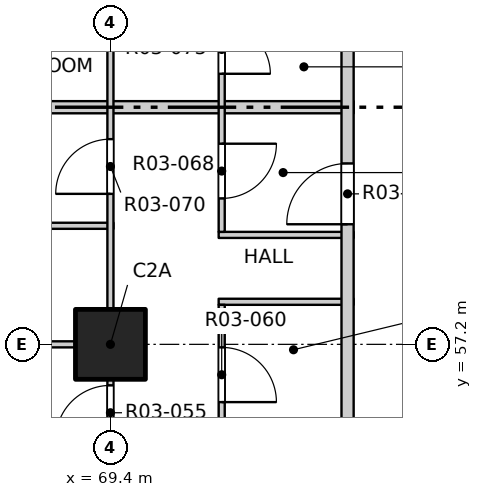
"""IFC4 building model, lengths in metres.
Left out: names, types, materials, properties, quantities, classifications, styles, units other than length and angle.
Written with IfcOpenShell. Run it as: python <this file> out.ifc"""

import sys

from ifc_helpers import new_model, si_unit, direction, frame, frame_2d, origin, origin_2d, place, context, subcontext, project, spatial, rectangle, extrude, element, fill, save


model = new_model("IFC4")
c1 = context("Model", 3, precision=1e-05, world=origin(), true_north=direction((0.0, 1.0)))
c2 = subcontext(c1, "Body", "Model", "MODEL_VIEW")
j1 = project(units=[si_unit("LENGTHUNIT", "METRE"), si_unit("PLANEANGLEUNIT", "RADIAN")], contexts=[c1])
p1 = place(None, origin())
s1 = spatial("IfcSite", under=j1, at=p1, CompositionType="ELEMENT")
p2 = place(p1, origin())
s2 = spatial("IfcBuilding", under=s1, at=p2, CompositionType="ELEMENT")
p3 = place(p2, frame((0.0, 0.0, 39.9)))
s3 = spatial("IfcBuildingStorey", under=s2, at=p3, CompositionType="ELEMENT", Elevation=39.9)
p4 = place(p3, frame((69.4, 57.2, -0.25), z_axis=(0.0, 0.0, 1.0), x_axis=(1.0, 0.0, 0.0)))
e1 = element("IfcColumn", 1, at=p4, inside=s3, PredefinedType="COLUMN", context=c2, shape_type="SweptSolid", body=[
    extrude(rectangle(XDim=1.15, YDim=1.15, at=origin_2d()), origin(), (0.0, 0.0, 1.0), 3.4),
])
p5 = place(p3, frame((61.9, 57.2, 0.0), z_axis=(0.0, 0.0, 1.0), x_axis=(1.0, 0.0, 0.0)))
e2 = element("IfcWall", 2, at=p5, inside=s3, PredefinedType="PARTITIONING", context=c2, shape_type="SweptSolid", body=[
    extrude(rectangle(XDim=7.55, YDim=0.1, at=frame_2d((3.775, 0.0))), origin(), (0.0, 0.0, 1.0), 2.55),
])
for number, where, z_axis, x_axis in (
    (3, (71.18, 57.9, 0.0), (0.0, 0.0, 1.0), (1.0, 0.0, 0.0)),
    (4, (71.18, 59.0, 0.0), (0.0, 0.0, 1.0), (1.0, 0.0, 0.0)),
):
    element("IfcWall", number, at=place(p3, frame(where, z_axis=z_axis, x_axis=x_axis)), inside=s3, PredefinedType="PARTITIONING", context=c2, shape_type="SweptSolid", body=[
        extrude(rectangle(XDim=2.22, YDim=0.1, at=frame_2d((1.11, 0.0))), origin(), (0.0, 0.0, 1.0), 3.15),
    ])
p6 = place(p3, frame((65.75, 59.15, 0.0), z_axis=(0.0, 0.0, 1.0), x_axis=(1.0, 0.0, 0.0)))
e5 = element("IfcWall", 5, at=p6, inside=s3, PredefinedType="PARTITIONING", context=c2, shape_type="SweptSolid", body=[
    extrude(rectangle(XDim=3.7, YDim=0.1, at=frame_2d((1.85, 0.0))), origin(), (0.0, 0.0, 1.0), 3.15),
])
p7 = place(p3, frame((61.9, 61.1, 0.0), z_axis=(0.0, 0.0, 1.0), x_axis=(1.0, 0.0, 0.0)))
e6 = element("IfcWall", 6, at=p7, inside=s3, PredefinedType="PARTITIONING", context=c2, shape_type="SweptSolid", body=[
    extrude(rectangle(XDim=11.5, YDim=0.2, at=frame_2d((5.75, 0.0))), origin(), (0.0, 0.0, 1.0), 3.15),
])
p8 = place(p3, frame((69.4, 41.9, 0.0), z_axis=(0.0, 0.0, 1.0), x_axis=(0.0, 1.0, 0.0)))
e7 = element("IfcWall", 7, at=p8, inside=s3, PredefinedType="PARTITIONING", context=c2, shape_type="SweptSolid", body=[
    extrude(rectangle(XDim=46.2, YDim=0.1, at=frame_2d((23.1, 0.0))), origin(), (0.0, 0.0, 1.0), 3.15),
])
p9 = place(p8, frame((1.2, 0.0, 0.0)))
e8 = element("IfcOpeningElement", 8, at=p9, cuts=e7, PredefinedType="OPENING", context=c2, shape_type="SweptSolid", body=[
    extrude(rectangle(XDim=0.9, YDim=2.1, at=frame_2d((0.45, 1.05))), frame((0.0, 0.06, 0.0), z_axis=(0.0, -1.0, 0.0), x_axis=(1.0, 0.0, 0.0)), (0.0, 0.0, 1.0), 0.12),
])
p10 = place(p8, frame((5.9, 0.0, 0.0)))
e9 = element("IfcOpeningElement", 9, at=p10, cuts=e7, PredefinedType="OPENING", context=c2, shape_type="SweptSolid", body=[
    extrude(rectangle(XDim=0.9, YDim=2.1, at=frame_2d((0.45, 1.05))), frame((0.0, 0.06, 0.0), z_axis=(0.0, -1.0, 0.0), x_axis=(1.0, 0.0, 0.0)), (0.0, 0.0, 1.0), 0.12),
])
p11 = place(p8, frame((9.0, 0.0, 0.0)))
e10 = element("IfcOpeningElement", 10, at=p11, cuts=e7, PredefinedType="OPENING", context=c2, shape_type="SweptSolid", body=[
    extrude(rectangle(XDim=0.9, YDim=2.1, at=frame_2d((0.45, 1.05))), frame((0.0, 0.06, 0.0), z_axis=(0.0, -1.0, 0.0), x_axis=(1.0, 0.0, 0.0)), (0.0, 0.0, 1.0), 0.12),
])
p12 = place(p8, frame((13.725, 0.0, 0.0)))
e11 = element("IfcOpeningElement", 11, at=p12, cuts=e7, PredefinedType="OPENING", context=c2, shape_type="SweptSolid", body=[
    extrude(rectangle(XDim=0.9, YDim=2.1, at=frame_2d((0.45, 1.05))), frame((0.0, 0.06, 0.0), z_axis=(0.0, -1.0, 0.0), x_axis=(1.0, 0.0, 0.0)), (0.0, 0.0, 1.0), 0.12),
])
p13 = place(p8, frame((17.775, 0.0, 0.0)))
e12 = element("IfcOpeningElement", 12, at=p13, cuts=e7, PredefinedType="OPENING", context=c2, shape_type="SweptSolid", body=[
    extrude(rectangle(XDim=0.9, YDim=2.1, at=frame_2d((0.45, 1.05))), frame((0.0, 0.06, 0.0), z_axis=(0.0, -1.0, 0.0), x_axis=(1.0, 0.0, 0.0)), (0.0, 0.0, 1.0), 0.12),
])
p14 = place(p8, frame((20.7, 0.0, 0.0)))
e13 = element("IfcOpeningElement", 13, at=p14, cuts=e7, PredefinedType="OPENING", context=c2, shape_type="SweptSolid", body=[
    extrude(rectangle(XDim=0.9, YDim=2.1, at=frame_2d((0.45, 1.05))), frame((0.0, 0.06, 0.0), z_axis=(0.0, -1.0, 0.0), x_axis=(1.0, 0.0, 0.0)), (0.0, 0.0, 1.0), 0.12),
])
p15 = place(p8, frame((25.575, 0.0, 0.0)))
e14 = element("IfcOpeningElement", 14, at=p15, cuts=e7, PredefinedType="OPENING", context=c2, shape_type="SweptSolid", body=[
    extrude(rectangle(XDim=0.9, YDim=2.1, at=frame_2d((0.45, 1.05))), frame((0.0, 0.06, 0.0), z_axis=(0.0, -1.0, 0.0), x_axis=(1.0, 0.0, 0.0)), (0.0, 0.0, 1.0), 0.12),
])
p16 = place(p8, frame((28.5, 0.0, 0.0)))
e15 = element("IfcOpeningElement", 15, at=p16, cuts=e7, PredefinedType="OPENING", context=c2, shape_type="SweptSolid", body=[
    extrude(rectangle(XDim=0.9, YDim=2.1, at=frame_2d((0.45, 1.05))), frame((0.0, 0.06, 0.0), z_axis=(0.0, -1.0, 0.0), x_axis=(1.0, 0.0, 0.0)), (0.0, 0.0, 1.0), 0.12),
])
p17 = place(p8, frame((33.375, 0.0, 0.0)))
e16 = element("IfcOpeningElement", 16, at=p17, cuts=e7, PredefinedType="OPENING", context=c2, shape_type="SweptSolid", body=[
    extrude(rectangle(XDim=0.9, YDim=2.1, at=frame_2d((0.45, 1.05))), frame((0.0, 0.06, 0.0), z_axis=(0.0, -1.0, 0.0), x_axis=(1.0, 0.0, 0.0)), (0.0, 0.0, 1.0), 0.12),
])
p18 = place(p8, frame((36.3, 0.0, 0.0)))
e17 = element("IfcOpeningElement", 17, at=p18, cuts=e7, PredefinedType="OPENING", context=c2, shape_type="SweptSolid", body=[
    extrude(rectangle(XDim=0.9, YDim=2.1, at=frame_2d((0.45, 1.05))), frame((0.0, 0.06, 0.0), z_axis=(0.0, -1.0, 0.0), x_axis=(1.0, 0.0, 0.0)), (0.0, 0.0, 1.0), 0.12),
])
p19 = place(p8, frame((40.2, 0.0, 0.0)))
e18 = element("IfcOpeningElement", 18, at=p19, cuts=e7, PredefinedType="OPENING", context=c2, shape_type="SweptSolid", body=[
    extrude(rectangle(XDim=0.9, YDim=2.1, at=frame_2d((0.45, 1.05))), frame((0.0, 0.06, 0.0), z_axis=(0.0, -1.0, 0.0), x_axis=(1.0, 0.0, 0.0)), (0.0, 0.0, 1.0), 0.12),
])
p20 = place(p8, frame((44.1, 0.0, 0.0)))
e19 = element("IfcOpeningElement", 19, at=p20, cuts=e7, PredefinedType="OPENING", context=c2, shape_type="SweptSolid", body=[
    extrude(rectangle(XDim=0.9, YDim=2.1, at=frame_2d((0.45, 1.05))), frame((0.0, 0.06, 0.0), z_axis=(0.0, -1.0, 0.0), x_axis=(1.0, 0.0, 0.0)), (0.0, 0.0, 1.0), 0.12),
])
p21 = place(p3, frame((71.23, 45.55, 0.0), z_axis=(0.0, 0.0, 1.0), x_axis=(0.0, 1.0, 0.0)))
e20 = element("IfcWall", 20, at=p21, inside=s3, PredefinedType="PARTITIONING", context=c2, shape_type="SweptSolid", body=[
    extrude(rectangle(XDim=12.3, YDim=0.1, at=frame_2d((6.15, 0.0))), origin(), (0.0, 0.0, 1.0), 3.15),
])
p22 = place(p21, frame((1.0, 0.0, 0.0)))
e21 = element("IfcOpeningElement", 21, at=p22, cuts=e20, PredefinedType="OPENING", context=c2, shape_type="SweptSolid", body=[
    extrude(rectangle(XDim=0.8, YDim=2.1, at=frame_2d((0.4, 1.05))), frame((0.0, 0.06, 0.0), z_axis=(0.0, -1.0, 0.0), x_axis=(1.0, 0.0, 0.0)), (0.0, 0.0, 1.0), 0.12),
])
p23 = place(p21, frame((3.35, 0.0, 0.0)))
e22 = element("IfcOpeningElement", 22, at=p23, cuts=e20, PredefinedType="OPENING", context=c2, shape_type="SweptSolid", body=[
    extrude(rectangle(XDim=0.9, YDim=2.1, at=frame_2d((0.45, 1.05))), frame((0.0, 0.06, 0.0), z_axis=(0.0, -1.0, 0.0), x_axis=(1.0, 0.0, 0.0)), (0.0, 0.0, 1.0), 0.12),
])
p24 = place(p21, frame((5.8, 0.0, 0.0)))
e23 = element("IfcOpeningElement", 23, at=p24, cuts=e20, PredefinedType="OPENING", context=c2, shape_type="SweptSolid", body=[
    extrude(rectangle(XDim=0.8, YDim=2.1, at=frame_2d((0.4, 1.05))), frame((0.0, 0.06, 0.0), z_axis=(0.0, -1.0, 0.0), x_axis=(1.0, 0.0, 0.0)), (0.0, 0.0, 1.0), 0.12),
])
p25 = place(p21, frame((8.4, 0.0, 0.0)))
e24 = element("IfcOpeningElement", 24, at=p25, cuts=e20, PredefinedType="OPENING", context=c2, shape_type="SweptSolid", body=[
    extrude(rectangle(XDim=0.8, YDim=2.1, at=frame_2d((0.4, 1.05))), frame((0.0, 0.06, 0.0), z_axis=(0.0, -1.0, 0.0), x_axis=(1.0, 0.0, 0.0)), (0.0, 0.0, 1.0), 0.12),
])
p26 = place(p21, frame((10.7, 0.0, 0.0)))
e25 = element("IfcOpeningElement", 25, at=p26, cuts=e20, PredefinedType="OPENING", context=c2, shape_type="SweptSolid", body=[
    extrude(rectangle(XDim=0.9, YDim=2.1, at=frame_2d((0.45, 1.05))), frame((0.0, 0.06, 0.0), z_axis=(0.0, -1.0, 0.0), x_axis=(1.0, 0.0, 0.0)), (0.0, 0.0, 1.0), 0.12),
])
p27 = place(p3, frame((71.23, 59.05, 0.0), z_axis=(0.0, 0.0, 1.0), x_axis=(0.0, 1.0, 0.0)))
e26 = element("IfcWall", 26, at=p27, inside=s3, PredefinedType="PARTITIONING", context=c2, shape_type="SweptSolid", body=[
    extrude(rectangle(XDim=3.9, YDim=0.1, at=frame_2d((1.95, 0.0))), origin(), (0.0, 0.0, 1.0), 3.15),
])
p28 = place(p27, frame((0.55, 0.0, 0.0)))
e27 = element("IfcOpeningElement", 27, at=p28, cuts=e26, PredefinedType="OPENING", context=c2, shape_type="SweptSolid", body=[
    extrude(rectangle(XDim=0.9, YDim=2.1, at=frame_2d((0.45, 1.05))), frame((0.0, 0.06, 0.0), z_axis=(0.0, -1.0, 0.0), x_axis=(1.0, 0.0, 0.0)), (0.0, 0.0, 1.0), 0.12),
])
p29 = place(p27, frame((2.6, 0.0, 0.0)))
e28 = element("IfcOpeningElement", 28, at=p29, cuts=e26, PredefinedType="OPENING", context=c2, shape_type="SweptSolid", body=[
    extrude(rectangle(XDim=0.8, YDim=2.1, at=frame_2d((0.4, 1.05))), frame((0.0, 0.06, 0.0), z_axis=(0.0, -1.0, 0.0), x_axis=(1.0, 0.0, 0.0)), (0.0, 0.0, 1.0), 0.12),
])
p30 = place(p3, frame((73.3, 53.4, 0.0), z_axis=(0.0, 0.0, 1.0), x_axis=(0.0, 1.0, 0.0)))
e29 = element("IfcWall", 29, at=p30, inside=s3, PredefinedType="PARTITIONING", context=c2, shape_type="SweptSolid", body=[
    extrude(rectangle(XDim=31.0, YDim=0.2, at=frame_2d((15.5, 0.0))), origin(), (0.0, 0.0, 1.0), 3.15),
])
p31 = place(p30, frame((5.775, 0.0, 0.0)))
e30 = element("IfcOpeningElement", 30, at=p31, cuts=e29, PredefinedType="OPENING", context=c2, shape_type="SweptSolid", body=[
    extrude(rectangle(XDim=1.0, YDim=2.1, at=frame_2d((0.5, 1.05))), frame((0.0, 0.11, 0.0), z_axis=(0.0, -1.0, 0.0), x_axis=(1.0, 0.0, 0.0)), (0.0, 0.0, 1.0), 0.22),
])
p32 = place(p30, frame((10.875, 0.0, 0.0)))
e31 = element("IfcOpeningElement", 31, at=p32, cuts=e29, PredefinedType="OPENING", context=c2, shape_type="SweptSolid", body=[
    extrude(rectangle(XDim=1.0, YDim=2.1, at=frame_2d((0.5, 1.05))), frame((0.0, 0.11, 0.0), z_axis=(0.0, -1.0, 0.0), x_axis=(1.0, 0.0, 0.0)), (0.0, 0.0, 1.0), 0.22),
])
p33 = place(p30, frame((18.025, 0.0, 0.0)))
e32 = element("IfcOpeningElement", 32, at=p33, cuts=e29, PredefinedType="OPENING", context=c2, shape_type="SweptSolid", body=[
    extrude(rectangle(XDim=1.0, YDim=2.1, at=frame_2d((0.5, 1.05))), frame((0.0, 0.11, 0.0), z_axis=(0.0, -1.0, 0.0), x_axis=(1.0, 0.0, 0.0)), (0.0, 0.0, 1.0), 0.22),
])
p34 = place(p30, frame((27.725, 0.0, 0.0)))
e33 = element("IfcOpeningElement", 33, at=p34, cuts=e29, PredefinedType="OPENING", context=c2, shape_type="SweptSolid", body=[
    extrude(rectangle(XDim=1.0, YDim=2.1, at=frame_2d((0.5, 1.05))), frame((0.0, 0.11, 0.0), z_axis=(0.0, -1.0, 0.0), x_axis=(1.0, 0.0, 0.0)), (0.0, 0.0, 1.0), 0.22),
])
p35 = place(p12, origin())
e34 = element("IfcDoor", 34, at=p35, inside=s3, OperationType="SINGLE_SWING_LEFT", PredefinedType="DOOR", context=c2, shape_type="SweptSolid", body=[
    extrude(rectangle(XDim=0.9, YDim=2.1, at=frame_2d((0.45, 1.05))), frame((0.0, 0.025, 0.0), z_axis=(0.0, -1.0, 0.0), x_axis=(1.0, 0.0, 0.0)), (0.0, 0.0, 1.0), 0.05),
])
fill(e11, e34)
p36 = place(p26, origin())
e35 = element("IfcDoor", 35, at=p36, inside=s3, OperationType="SINGLE_SWING_RIGHT", PredefinedType="DOOR", context=c2, shape_type="SweptSolid", body=[
    extrude(rectangle(XDim=0.9, YDim=2.1, at=frame_2d((0.45, 1.05))), frame((0.0, 0.025, 0.0), z_axis=(0.0, -1.0, 0.0), x_axis=(1.0, 0.0, 0.0)), (0.0, 0.0, 1.0), 0.05),
])
fill(e25, e35)
p37 = place(p31, origin())
e36 = element("IfcDoor", 36, at=p37, inside=s3, OperationType="SINGLE_SWING_RIGHT", PredefinedType="DOOR", context=c2, shape_type="SweptSolid", body=[
    extrude(rectangle(XDim=1.0, YDim=2.1, at=frame_2d((0.5, 1.05))), frame((0.0, 0.025, 0.0), z_axis=(0.0, -1.0, 0.0), x_axis=(1.0, 0.0, 0.0)), (0.0, 0.0, 1.0), 0.05),
])
fill(e30, e36)
p38 = place(p28, origin())
e37 = element("IfcDoor", 37, at=p38, inside=s3, OperationType="SINGLE_SWING_LEFT", PredefinedType="DOOR", context=c2, shape_type="SweptSolid", body=[
    extrude(rectangle(XDim=0.9, YDim=2.1, at=frame_2d((0.45, 1.05))), frame((0.0, 0.025, 0.0), z_axis=(0.0, -1.0, 0.0), x_axis=(1.0, 0.0, 0.0)), (0.0, 0.0, 1.0), 0.05),
])
fill(e27, e37)
p39 = place(p13, origin())
e38 = element("IfcDoor", 38, at=p39, inside=s3, OperationType="SINGLE_SWING_LEFT", PredefinedType="DOOR", context=c2, shape_type="SweptSolid", body=[
    extrude(rectangle(XDim=0.9, YDim=2.1, at=frame_2d((0.45, 1.05))), frame((0.0, 0.025, 0.0), z_axis=(0.0, -1.0, 0.0), x_axis=(1.0, 0.0, 0.0)), (0.0, 0.0, 1.0), 0.05),
])
fill(e12, e38)
p40 = place(p29, origin())
e39 = element("IfcDoor", 39, at=p40, inside=s3, OperationType="SINGLE_SWING_RIGHT", PredefinedType="DOOR", context=c2, shape_type="SweptSolid", body=[
    extrude(rectangle(XDim=0.8, YDim=2.1, at=frame_2d((0.4, 1.05))), frame((0.0, 0.025, 0.0), z_axis=(0.0, -1.0, 0.0), x_axis=(1.0, 0.0, 0.0)), (0.0, 0.0, 1.0), 0.05),
])
fill(e28, e39)
save(model, sys.argv[1])
